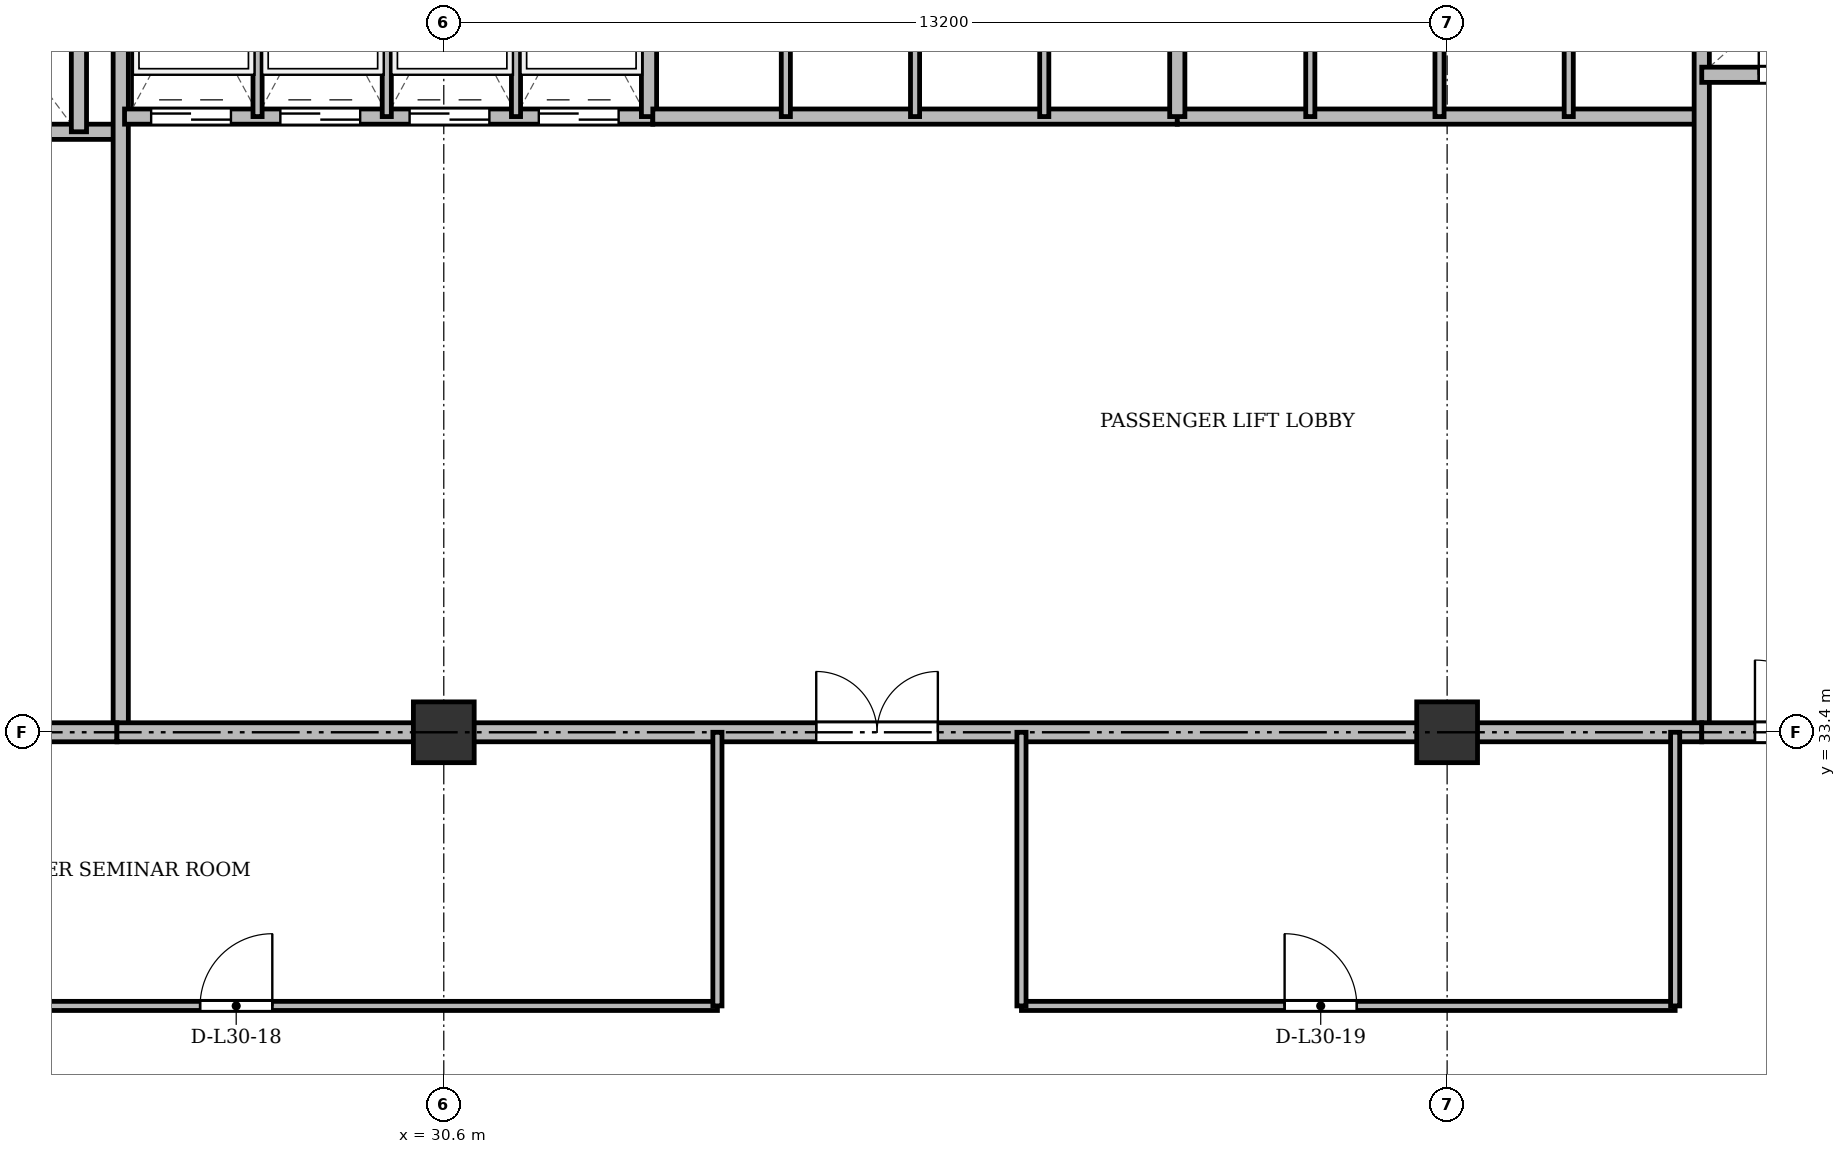
"""IFC4 building model, lengths in metres.
Left out: names, types, materials, properties, quantities, classifications, styles, units other than length and angle.
Written with IfcOpenShell. Run it as: python <this file> out.ifc"""

import sys

from ifc_helpers import new_model, si_unit, direction, frame, frame_2d, origin, origin_2d, place, context, subcontext, project, spatial, rectangle, extrude, source, transform, mapped, element, fill, save


model = new_model("IFC4")
c1 = context("Model", 3, precision=1e-05, world=origin(), true_north=direction((0.0, 1.0)))
c2 = subcontext(c1, "Body", "Model", "MODEL_VIEW")
j1 = project(units=[si_unit("LENGTHUNIT", "METRE"), si_unit("PLANEANGLEUNIT", "RADIAN")], contexts=[c1])
p1 = place(None, origin())
s1 = spatial("IfcSite", under=j1, at=p1, CompositionType="ELEMENT")
p2 = place(p1, origin())
s2 = spatial("IfcBuilding", under=s1, at=p2, CompositionType="ELEMENT")
p3 = place(p2, frame((0.0, 0.0, 117.7)))
s3 = spatial("IfcBuildingStorey", under=s2, at=p3, CompositionType="ELEMENT", Elevation=117.7)
m1 = source(origin(), c2, "Body", "SweptSolid", [
    extrude(rectangle(XDim=0.8, YDim=0.8, at=origin_2d()), origin(), (0.0, 0.0, 1.0), 3.6),
])
for number, where, z_axis, x_axis in (
    (1, (30.6, 33.4, 0.0), (0.0, 0.0, 1.0), (1.0, 0.0, 0.0)),
    (2, (43.8, 33.4, 0.0), (0.0, 0.0, 1.0), (1.0, 0.0, 0.0)),
):
    element("IfcColumn", number, at=place(p3, frame(where, z_axis=z_axis, x_axis=x_axis)), inside=s3, PredefinedType="COLUMN", context=c2, shape_type="MappedRepresentation", body=[
        mapped(m1, transform((0.0, 0.0, 0.0), x_axis=(1.0, 0.0, 0.0), y_axis=(0.0, 1.0, 0.0), z_axis=(0.0, 0.0, 1.0), scale=1.0)),
    ])
p4 = place(p3, frame((19.55, 41.3, 0.0), z_axis=(0.0, 0.0, 1.0), x_axis=(1.0, 0.0, 0.0)))
e3 = element("IfcWall", 3, at=p4, inside=s3, PredefinedType="SOLIDWALL", context=c2, shape_type="SweptSolid", body=[
    extrude(rectangle(XDim=6.75, YDim=0.2, at=frame_2d((3.375, 0.0))), origin(), (0.0, 0.0, 1.0), 3.34),
])
p5 = place(p4, frame((1.7, 0.0, 0.0)))
e4 = element("IfcOpeningElement", 4, at=p5, cuts=e3, PredefinedType="OPENING", context=c2, shape_type="SweptSolid", body=[
    extrude(rectangle(XDim=1.1, YDim=2.15, at=frame_2d((0.55, 1.075))), frame((0.0, 0.11, 0.0), z_axis=(0.0, -1.0, 0.0), x_axis=(1.0, 0.0, 0.0)), (0.0, 0.0, 1.0), 0.22),
])
p6 = place(p4, frame((4.4, 0.0, 0.0)))
e5 = element("IfcOpeningElement", 5, at=p6, cuts=e3, PredefinedType="OPENING", context=c2, shape_type="SweptSolid", body=[
    extrude(rectangle(XDim=1.1, YDim=2.15, at=frame_2d((0.55, 1.075))), frame((0.0, 0.11, 0.0), z_axis=(0.0, -1.0, 0.0), x_axis=(1.0, 0.0, 0.0)), (0.0, 0.0, 1.0), 0.22),
])
p7 = place(p3, frame((25.8, 41.3, 0.0), z_axis=(0.0, 0.0, 1.0), x_axis=(0.0, 1.0, 0.0)))
e6 = element("IfcWall", 6, at=p7, inside=s3, PredefinedType="SOLIDWALL", context=c2, shape_type="SweptSolid", body=[
    extrude(rectangle(XDim=3.4, YDim=0.2, at=frame_2d((1.7, 0.0))), origin(), (0.0, 0.0, 1.0), 3.34),
])
p8 = place(p3, frame((26.35, 33.4, 0.0), z_axis=(0.0, 0.0, 1.0), x_axis=(0.0, 1.0, 0.0)))
e7 = element("IfcWall", 7, at=p8, inside=s3, PredefinedType="SOLIDWALL", context=c2, shape_type="SweptSolid", body=[
    extrude(rectangle(XDim=11.3, YDim=0.2, at=frame_2d((5.65, 0.0))), origin(), (0.0, 0.0, 1.0), 2.752),
])
p9 = place(p3, frame((19.5, 33.4, 0.0), z_axis=(0.0, 0.0, 1.0), x_axis=(1.0, 0.0, 0.0)))
e8 = element("IfcWall", 8, at=p9, inside=s3, PredefinedType="PARTITIONING", context=c2, shape_type="SweptSolid", body=[
    extrude(rectangle(XDim=6.8, YDim=0.25, at=frame_2d((3.4, 0.0))), origin(), (0.0, 0.0, 1.0), 2.752),
])
p10 = place(p9, frame((0.75, 0.0, 0.0)))
e9 = element("IfcOpeningElement", 9, at=p10, cuts=e8, PredefinedType="OPENING", context=c2, shape_type="SweptSolid", body=[
    extrude(rectangle(XDim=1.6, YDim=2.2, at=frame_2d((0.8, 1.1))), frame((0.0, 0.135, 0.0), z_axis=(0.0, -1.0, 0.0), x_axis=(1.0, 0.0, 0.0)), (0.0, 0.0, 1.0), 0.27),
])
p11 = place(p3, frame((26.4, 41.5, 0.0), z_axis=(0.0, 0.0, 1.0), x_axis=(1.0, 0.0, 0.0)))
e10 = element("IfcWall", 10, at=p11, inside=s3, PredefinedType="SOLIDWALL", context=c2, shape_type="SweptSolid", body=[
    extrude(rectangle(XDim=6.95, YDim=0.2, at=frame_2d((3.475, 0.0))), origin(), (0.0, 0.0, 1.0), 3.34),
])
p12 = place(p11, frame((0.35, 0.0, 0.0)))
e11 = element("IfcOpeningElement", 11, at=p12, cuts=e10, PredefinedType="OPENING", context=c2, shape_type="SweptSolid", body=[
    extrude(rectangle(XDim=1.05, YDim=2.15, at=frame_2d((0.525, 1.075))), frame((0.0, 0.11, 0.0), z_axis=(0.0, -1.0, 0.0), x_axis=(1.0, 0.0, 0.0)), (0.0, 0.0, 1.0), 0.22),
])
p13 = place(p11, frame((2.05, 0.0, 0.0)))
e12 = element("IfcOpeningElement", 12, at=p13, cuts=e10, PredefinedType="OPENING", context=c2, shape_type="SweptSolid", body=[
    extrude(rectangle(XDim=1.05, YDim=2.15, at=frame_2d((0.525, 1.075))), frame((0.0, 0.11, 0.0), z_axis=(0.0, -1.0, 0.0), x_axis=(1.0, 0.0, 0.0)), (0.0, 0.0, 1.0), 0.22),
])
p14 = place(p11, frame((3.75, 0.0, 0.0)))
e13 = element("IfcOpeningElement", 13, at=p14, cuts=e10, PredefinedType="OPENING", context=c2, shape_type="SweptSolid", body=[
    extrude(rectangle(XDim=1.05, YDim=2.15, at=frame_2d((0.525, 1.075))), frame((0.0, 0.11, 0.0), z_axis=(0.0, -1.0, 0.0), x_axis=(1.0, 0.0, 0.0)), (0.0, 0.0, 1.0), 0.22),
])
p15 = place(p11, frame((5.45, 0.0, 0.0)))
e14 = element("IfcOpeningElement", 14, at=p15, cuts=e10, PredefinedType="OPENING", context=c2, shape_type="SweptSolid", body=[
    extrude(rectangle(XDim=1.05, YDim=2.15, at=frame_2d((0.525, 1.075))), frame((0.0, 0.11, 0.0), z_axis=(0.0, -1.0, 0.0), x_axis=(1.0, 0.0, 0.0)), (0.0, 0.0, 1.0), 0.22),
])
p16 = place(p3, frame((33.3, 41.5, 0.0), z_axis=(0.0, 0.0, 1.0), x_axis=(0.0, 1.0, 0.0)))
e15 = element("IfcWall", 15, at=p16, inside=s3, PredefinedType="SOLIDWALL", context=c2, shape_type="SweptSolid", body=[
    extrude(rectangle(XDim=3.2, YDim=0.2, at=frame_2d((1.6, 0.0))), origin(), (0.0, 0.0, 1.0), 3.34),
])
for number, where, z_axis, x_axis in (
    (16, (28.15, 41.5, 0.0), (0.0, 0.0, 1.0), (0.0, 1.0, 0.0)),
    (17, (29.85, 41.5, 0.0), (0.0, 0.0, 1.0), (0.0, 1.0, 0.0)),
    (18, (31.55, 41.5, 0.0), (0.0, 0.0, 1.0), (0.0, 1.0, 0.0)),
):
    element("IfcWall", number, at=place(p3, frame(where, z_axis=z_axis, x_axis=x_axis)), inside=s3, PredefinedType="PARTITIONING", context=c2, shape_type="SweptSolid", body=[
        extrude(rectangle(XDim=3.2, YDim=0.12, at=frame_2d((1.6, 0.0))), origin(), (0.0, 0.0, 1.0), 3.34),
    ])
p17 = place(p3, frame((33.35, 41.5, 0.0), z_axis=(0.0, 0.0, 1.0), x_axis=(1.0, 0.0, 0.0)))
e19 = element("IfcWall", 19, at=p17, inside=s3, PredefinedType="SOLIDWALL", context=c2, shape_type="SweptSolid", body=[
    extrude(rectangle(XDim=6.9, YDim=0.2, at=frame_2d((3.45, 0.0))), origin(), (0.0, 0.0, 1.0), 3.34),
])
for number, where, z_axis, x_axis in (
    (20, (35.1, 41.5, 0.0), (0.0, 0.0, 1.0), (0.0, 1.0, 0.0)),
    (21, (36.8, 41.5, 0.0), (0.0, 0.0, 1.0), (0.0, 1.0, 0.0)),
    (22, (38.5, 41.5, 0.0), (0.0, 0.0, 1.0), (0.0, 1.0, 0.0)),
):
    element("IfcWall", number, at=place(p3, frame(where, z_axis=z_axis, x_axis=x_axis)), inside=s3, PredefinedType="PARTITIONING", context=c2, shape_type="SweptSolid", body=[
        extrude(rectangle(XDim=3.2, YDim=0.12, at=frame_2d((1.6, 0.0))), origin(), (0.0, 0.0, 1.0), 3.34),
    ])
p18 = place(p3, frame((40.25, 41.5, 0.0), z_axis=(0.0, 0.0, 1.0), x_axis=(1.0, 0.0, 0.0)))
e23 = element("IfcWall", 23, at=p18, inside=s3, PredefinedType="SOLIDWALL", context=c2, shape_type="SweptSolid", body=[
    extrude(rectangle(XDim=6.9, YDim=0.2, at=frame_2d((3.45, 0.0))), origin(), (0.0, 0.0, 1.0), 2.84),
])
p19 = place(p3, frame((40.25, 41.5, 0.0), z_axis=(0.0, 0.0, 1.0), x_axis=(0.0, 1.0, 0.0)))
e24 = element("IfcWall", 24, at=p19, inside=s3, PredefinedType="SOLIDWALL", context=c2, shape_type="SweptSolid", body=[
    extrude(rectangle(XDim=3.2, YDim=0.2, at=frame_2d((1.6, 0.0))), origin(), (0.0, 0.0, 1.0), 3.34),
])
p20 = place(p3, frame((42.0, 41.5, 0.0), z_axis=(0.0, 0.0, 1.0), x_axis=(0.0, 1.0, 0.0)))
e25 = element("IfcWall", 25, at=p20, inside=s3, PredefinedType="PARTITIONING", context=c2, shape_type="SweptSolid", body=[
    extrude(rectangle(XDim=3.2, YDim=0.12, at=frame_2d((1.6, 0.0))), origin(), (0.0, 0.0, 1.0), 3.34),
])
p21 = place(p3, frame((43.7, 41.5, 0.0), z_axis=(0.0, 0.0, 1.0), x_axis=(0.0, 1.0, 0.0)))
e26 = element("IfcWall", 26, at=p21, inside=s3, PredefinedType="PARTITIONING", context=c2, shape_type="SweptSolid", body=[
    extrude(rectangle(XDim=3.2, YDim=0.12, at=frame_2d((1.6, 0.0))), origin(), (0.0, 0.0, 1.0), 2.84),
])
p22 = place(p3, frame((45.4, 41.5, 0.0), z_axis=(0.0, 0.0, 1.0), x_axis=(0.0, 1.0, 0.0)))
e27 = element("IfcWall", 27, at=p22, inside=s3, PredefinedType="PARTITIONING", context=c2, shape_type="SweptSolid", body=[
    extrude(rectangle(XDim=3.2, YDim=0.12, at=frame_2d((1.6, 0.0))), origin(), (0.0, 0.0, 1.0), 3.34),
])
p23 = place(p3, frame((47.15, 33.4, 0.0), z_axis=(0.0, 0.0, 1.0), x_axis=(0.0, 1.0, 0.0)))
e28 = element("IfcWall", 28, at=p23, inside=s3, PredefinedType="SOLIDWALL", context=c2, shape_type="SweptSolid", body=[
    extrude(rectangle(XDim=11.3, YDim=0.2, at=frame_2d((5.65, 0.0))), origin(), (0.0, 0.0, 1.0), 2.752),
])
p24 = place(p3, frame((26.3, 33.4, 0.0), z_axis=(0.0, 0.0, 1.0), x_axis=(1.0, 0.0, 0.0)))
e29 = element("IfcWall", 29, at=p24, inside=s3, PredefinedType="PARTITIONING", context=c2, shape_type="SweptSolid", body=[
    extrude(rectangle(XDim=20.85, YDim=0.25, at=frame_2d((10.425, 0.0))), origin(), (0.0, 0.0, 1.0), 2.752),
])
p25 = place(p24, frame((9.2, 0.0, 0.0)))
e30 = element("IfcOpeningElement", 30, at=p25, cuts=e29, PredefinedType="OPENING", context=c2, shape_type="SweptSolid", body=[
    extrude(rectangle(XDim=1.6, YDim=2.2, at=frame_2d((0.8, 1.1))), frame((0.0, 0.135, 0.0), z_axis=(0.0, -1.0, 0.0), x_axis=(1.0, 0.0, 0.0)), (0.0, 0.0, 1.0), 0.27),
])
p26 = place(p3, frame((47.15, 42.05, 0.0), z_axis=(0.0, 0.0, 1.0), x_axis=(1.0, 0.0, 0.0)))
e31 = element("IfcWall", 31, at=p26, inside=s3, PredefinedType="SOLIDWALL", context=c2, shape_type="SweptSolid", body=[
    extrude(rectangle(XDim=7.85, YDim=0.2, at=frame_2d((3.925, 0.0))), origin(), (0.0, 0.0, 1.0), 2.84),
])
p27 = place(p26, frame((0.75, 0.0, 0.0)))
e32 = element("IfcOpeningElement", 32, at=p27, cuts=e31, PredefinedType="OPENING", context=c2, shape_type="SweptSolid", body=[
    extrude(rectangle(XDim=0.9, YDim=2.1, at=frame_2d((0.45, 1.05))), frame((0.0, 0.11, 0.0), z_axis=(0.0, -1.0, 0.0), x_axis=(1.0, 0.0, 0.0)), (0.0, 0.0, 1.0), 0.22),
])
p28 = place(p26, frame((3.85, 0.0, 0.0)))
e33 = element("IfcOpeningElement", 33, at=p28, cuts=e31, PredefinedType="OPENING", context=c2, shape_type="SweptSolid", body=[
    extrude(rectangle(XDim=0.9, YDim=2.1, at=frame_2d((0.45, 1.05))), frame((0.0, 0.11, 0.0), z_axis=(0.0, -1.0, 0.0), x_axis=(1.0, 0.0, 0.0)), (0.0, 0.0, 1.0), 0.22),
])
p29 = place(p3, frame((47.15, 33.4, 0.0), z_axis=(0.0, 0.0, 1.0), x_axis=(1.0, 0.0, 0.0)))
e34 = element("IfcWall", 34, at=p29, inside=s3, PredefinedType="PARTITIONING", context=c2, shape_type="SweptSolid", body=[
    extrude(rectangle(XDim=11.15, YDim=0.25, at=frame_2d((5.575, 0.0))), origin(), (0.0, 0.0, 1.0), 2.752),
])
p30 = place(p29, frame((0.7, 0.0, 0.0)))
e35 = element("IfcOpeningElement", 35, at=p30, cuts=e34, PredefinedType="OPENING", context=c2, shape_type="SweptSolid", body=[
    extrude(rectangle(XDim=0.95, YDim=2.15, at=frame_2d((0.475, 1.075))), frame((0.0, 0.135, 0.0), z_axis=(0.0, -1.0, 0.0), x_axis=(1.0, 0.0, 0.0)), (0.0, 0.0, 1.0), 0.27),
])
p31 = place(p29, frame((6.0, 0.0, 0.0)))
e36 = element("IfcOpeningElement", 36, at=p31, cuts=e34, PredefinedType="OPENING", context=c2, shape_type="SweptSolid", body=[
    extrude(rectangle(XDim=1.2, YDim=2.15, at=frame_2d((0.6, 1.075))), frame((0.0, 0.135, 0.0), z_axis=(0.0, -1.0, 0.0), x_axis=(1.0, 0.0, 0.0)), (0.0, 0.0, 1.0), 0.27),
])
p32 = place(p3, frame((22.45, 29.8, 0.0), z_axis=(0.0, 0.0, 1.0), x_axis=(1.0, 0.0, 0.0)))
e37 = element("IfcWall", 37, at=p32, inside=s3, PredefinedType="PARTITIONING", context=c2, shape_type="SweptSolid", body=[
    extrude(rectangle(XDim=11.75, YDim=0.12, at=frame_2d((5.875, 0.0))), origin(), (0.0, 0.0, 1.0), 2.84),
])
p33 = place(p32, frame((4.944, 0.0, 0.0)))
e38 = element("IfcOpeningElement", 38, at=p33, cuts=e37, PredefinedType="OPENING", context=c2, shape_type="SweptSolid", body=[
    extrude(rectangle(XDim=0.95, YDim=2.15, at=frame_2d((0.475, 1.075))), frame((0.0, 0.07, 0.0), z_axis=(0.0, -1.0, 0.0), x_axis=(1.0, 0.0, 0.0)), (0.0, 0.0, 1.0), 0.14),
])
p34 = place(p3, frame((38.2, 29.8, 0.0), z_axis=(0.0, 0.0, 1.0), x_axis=(1.0, 0.0, 0.0)))
e39 = element("IfcWall", 39, at=p34, inside=s3, PredefinedType="PARTITIONING", context=c2, shape_type="SweptSolid", body=[
    extrude(rectangle(XDim=8.6, YDim=0.12, at=frame_2d((4.3, 0.0))), origin(), (0.0, 0.0, 1.0), 2.84),
])
p35 = place(p34, frame((3.462, 0.0, 0.0)))
e40 = element("IfcOpeningElement", 40, at=p35, cuts=e39, PredefinedType="OPENING", context=c2, shape_type="SweptSolid", body=[
    extrude(rectangle(XDim=0.95, YDim=2.15, at=frame_2d((0.475, 1.075))), frame((0.0, 0.07, 0.0), z_axis=(0.0, -1.0, 0.0), x_axis=(1.0, 0.0, 0.0)), (0.0, 0.0, 1.0), 0.14),
])
for number, where, z_axis, x_axis in (
    (41, (34.2, 29.8, 0.0), (0.0, 0.0, 1.0), (0.0, 1.0, 0.0)),
    (42, (38.2, 29.8, 0.0), (0.0, 0.0, 1.0), (0.0, 1.0, 0.0)),
    (43, (46.8, 29.8, 0.0), (0.0, 0.0, 1.0), (0.0, 1.0, 0.0)),
):
    element("IfcWall", number, at=place(p3, frame(where, z_axis=z_axis, x_axis=x_axis)), inside=s3, PredefinedType="PARTITIONING", context=c2, shape_type="SweptSolid", body=[
        extrude(rectangle(XDim=3.6, YDim=0.12, at=frame_2d((1.8, 0.0))), origin(), (0.0, 0.0, 1.0), 2.752),
    ])
m2 = source(origin(), c2, "Body", "SweptSolid", [
    extrude(rectangle(XDim=1.05, YDim=2.15, at=frame_2d((0.525, 1.075))), frame((0.0, 0.025, 0.0), z_axis=(0.0, -1.0, 0.0), x_axis=(1.0, 0.0, 0.0)), (0.0, 0.0, 1.0), 0.05),
])
p36 = place(p12, origin())
e44 = element("IfcDoor", 44, at=p36, inside=s3, OperationType="DOUBLE_DOOR_SLIDING", PredefinedType="DOOR", context=c2, shape_type="MappedRepresentation", body=[
    mapped(m2, transform((0.0, 0.0, 0.0), x_axis=(1.0, 0.0, 0.0), y_axis=(0.0, 1.0, 0.0), z_axis=(0.0, 0.0, 1.0), scale=1.0)),
])
fill(e11, e44)
p37 = place(p13, origin())
e45 = element("IfcDoor", 45, at=p37, inside=s3, OperationType="DOUBLE_DOOR_SLIDING", PredefinedType="DOOR", context=c2, shape_type="MappedRepresentation", body=[
    mapped(m2, transform((0.0, 0.0, 0.0), x_axis=(1.0, 0.0, 0.0), y_axis=(0.0, 1.0, 0.0), z_axis=(0.0, 0.0, 1.0), scale=1.0)),
])
fill(e12, e45)
p38 = place(p14, origin())
e46 = element("IfcDoor", 46, at=p38, inside=s3, OperationType="DOUBLE_DOOR_SLIDING", PredefinedType="DOOR", context=c2, shape_type="MappedRepresentation", body=[
    mapped(m2, transform((0.0, 0.0, 0.0), x_axis=(1.0, 0.0, 0.0), y_axis=(0.0, 1.0, 0.0), z_axis=(0.0, 0.0, 1.0), scale=1.0)),
])
fill(e13, e46)
p39 = place(p15, origin())
e47 = element("IfcDoor", 47, at=p39, inside=s3, OperationType="DOUBLE_DOOR_SLIDING", PredefinedType="DOOR", context=c2, shape_type="MappedRepresentation", body=[
    mapped(m2, transform((0.0, 0.0, 0.0), x_axis=(1.0, 0.0, 0.0), y_axis=(0.0, 1.0, 0.0), z_axis=(0.0, 0.0, 1.0), scale=1.0)),
])
fill(e14, e47)
m3 = source(origin(), c2, "Body", "SweptSolid", [
    extrude(rectangle(XDim=1.6, YDim=2.2, at=frame_2d((0.8, 1.1))), frame((0.0, 0.025, 0.0), z_axis=(0.0, -1.0, 0.0), x_axis=(1.0, 0.0, 0.0)), (0.0, 0.0, 1.0), 0.05),
])
p40 = place(p25, origin())
e48 = element("IfcDoor", 48, at=p40, inside=s3, OperationType="DOUBLE_DOOR_SINGLE_SWING", PredefinedType="DOOR", context=c2, shape_type="MappedRepresentation", body=[
    mapped(m3, transform((0.0, 0.0, 0.0), x_axis=(1.0, 0.0, 0.0), y_axis=(0.0, 1.0, 0.0), z_axis=(0.0, 0.0, 1.0), scale=1.0)),
])
fill(e30, e48)
m4 = source(origin(), c2, "Body", "SweptSolid", [
    extrude(rectangle(XDim=0.9, YDim=2.1, at=frame_2d((0.45, 1.05))), frame((0.0, 0.025, 0.0), z_axis=(0.0, -1.0, 0.0), x_axis=(1.0, 0.0, 0.0)), (0.0, 0.0, 1.0), 0.05),
])
p41 = place(p27, origin())
e49 = element("IfcDoor", 49, at=p41, inside=s3, OperationType="SINGLE_SWING_LEFT", PredefinedType="DOOR", context=c2, shape_type="MappedRepresentation", body=[
    mapped(m4, transform((0.0, 0.0, 0.0), x_axis=(1.0, 0.0, 0.0), y_axis=(0.0, 1.0, 0.0), z_axis=(0.0, 0.0, 1.0), scale=1.0)),
])
fill(e32, e49)
m5 = source(origin(), c2, "Body", "SweptSolid", [
    extrude(rectangle(XDim=0.95, YDim=2.15, at=frame_2d((0.475, 1.075))), frame((0.0, 0.025, 0.0), z_axis=(0.0, -1.0, 0.0), x_axis=(1.0, 0.0, 0.0)), (0.0, 0.0, 1.0), 0.05),
])
p42 = place(p30, origin())
e50 = element("IfcDoor", 50, at=p42, inside=s3, OperationType="SINGLE_SWING_LEFT", PredefinedType="DOOR", context=c2, shape_type="MappedRepresentation", body=[
    mapped(m5, transform((0.0, 0.0, 0.0), x_axis=(1.0, 0.0, 0.0), y_axis=(0.0, 1.0, 0.0), z_axis=(0.0, 0.0, 1.0), scale=1.0)),
])
fill(e35, e50)
p43 = place(p33, origin())
e51 = element("IfcDoor", 51, at=p43, inside=s3, OperationType="SINGLE_SWING_RIGHT", PredefinedType="DOOR", context=c2, shape_type="MappedRepresentation", body=[
    mapped(m5, transform((0.0, 0.0, 0.0), x_axis=(1.0, 0.0, 0.0), y_axis=(0.0, 1.0, 0.0), z_axis=(0.0, 0.0, 1.0), scale=1.0)),
])
fill(e38, e51)
p44 = place(p35, origin())
e52 = element("IfcDoor", 52, at=p44, inside=s3, OperationType="SINGLE_SWING_LEFT", PredefinedType="DOOR", context=c2, shape_type="MappedRepresentation", body=[
    mapped(m5, transform((0.0, 0.0, 0.0), x_axis=(1.0, 0.0, 0.0), y_axis=(0.0, 1.0, 0.0), z_axis=(0.0, 0.0, 1.0), scale=1.0)),
])
fill(e40, e52)
save(model, sys.argv[1])
